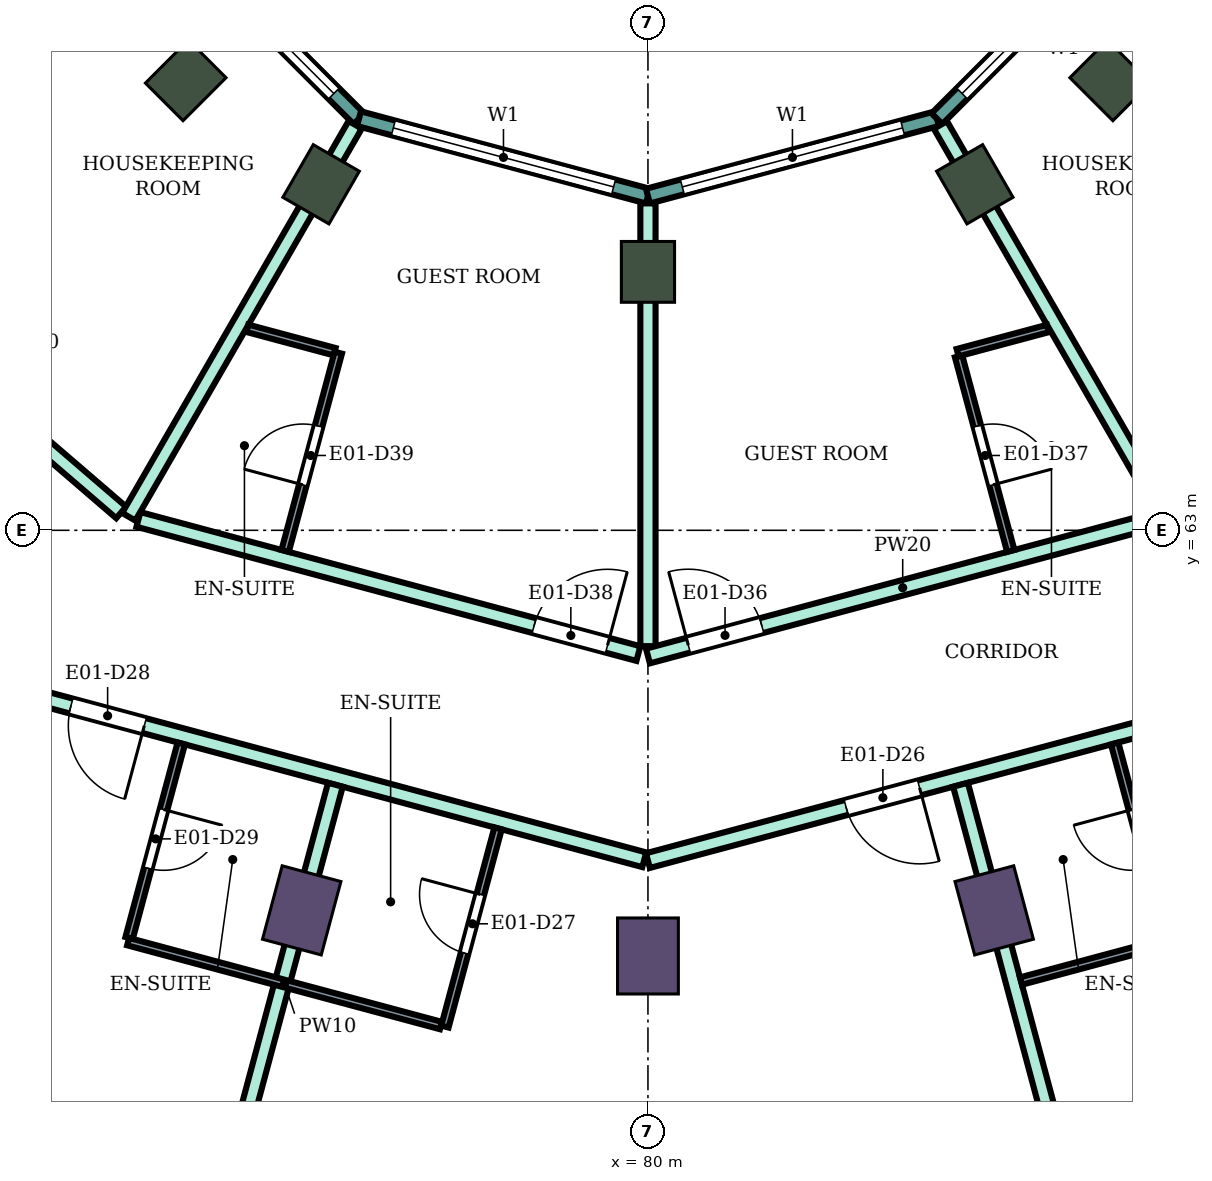
"""IFC4 building model, lengths in metres.
Left out: names, types, materials, properties, quantities, classifications, styles, units other than length and angle.
Written with IfcOpenShell. Run it as: python <this file> out.ifc"""

import sys

from ifc_helpers import new_model, si_unit, direction, frame, frame_2d, origin, origin_2d, place, context, subcontext, project, spatial, rectangle, extrude, element, fill, save


model = new_model("IFC4")
c1 = context("Model", 3, precision=1e-05, world=origin(), true_north=direction((0.0, 1.0)))
c2 = subcontext(c1, "Body", "Model", "MODEL_VIEW")
j1 = project(units=[si_unit("LENGTHUNIT", "METRE"), si_unit("PLANEANGLEUNIT", "RADIAN")], contexts=[c1])
p1 = place(None, origin())
s1 = spatial("IfcSite", under=j1, at=p1, CompositionType="ELEMENT")
p2 = place(p1, origin())
s2 = spatial("IfcBuilding", under=s1, at=p2, CompositionType="ELEMENT")
p3 = place(p2, frame((0.0, 0.0, 118.5)))
s3 = spatial("IfcBuildingStorey", under=s2, at=p3, CompositionType="ELEMENT", Elevation=118.5)
for number, where, z_axis, x_axis in (
    (1, (75.445, 58.0, 0.0), (0.0, 0.0, 1.0), (-0.259, -0.966, 0.0)),
    (2, (80.0, 57.4, 0.0), (0.0, 0.0, 1.0), (0.0, -1.0, 0.0)),
    (3, (84.555, 58.0, 0.0), (0.0, 0.0, 1.0), (0.259, -0.966, 0.0)),
):
    element("IfcColumn", number, at=place(p3, frame(where, z_axis=z_axis, x_axis=x_axis)), inside=s3, PredefinedType="COLUMN", context=c2, shape_type="SweptSolid", body=[
        extrude(rectangle(XDim=1.0, YDim=0.8, at=origin_2d()), origin(), (0.0, 0.0, 1.0), 3.9),
    ])
for number, where, z_axis, x_axis in (
    (4, (73.919, 68.919, 0.0), (0.0, 0.0, 1.0), (-0.707, -0.707, 0.0)),
    (5, (75.7, 67.552, 0.0), (0.0, 0.0, 1.0), (-0.5, -0.866, 0.0)),
    (6, (80.0, 66.4, 0.0), (0.0, 0.0, 1.0), (0.0, -1.0, 0.0)),
    (7, (84.3, 67.552, 0.0), (0.0, 0.0, 1.0), (0.5, -0.866, 0.0)),
    (8, (86.081, 68.919, 0.0), (0.0, 0.0, 1.0), (0.707, -0.707, 0.0)),
):
    element("IfcColumn", number, at=place(p3, frame(where, z_axis=z_axis, x_axis=x_axis)), inside=s3, PredefinedType="COLUMN", context=c2, shape_type="SweptSolid", body=[
        extrude(rectangle(XDim=0.8, YDim=0.7, at=origin_2d()), origin(), (0.0, 0.0, 1.0), 3.9),
    ])
p4 = place(p3, frame((73.415, 71.198, 0.0), z_axis=(0.0, 0.0, 1.0), x_axis=(0.707106781187, -0.707106781187, 0.0)))
e9 = element("IfcWall", 9, at=p4, inside=s3, PredefinedType="NOTDEFINED", context=c2, shape_type="SweptSolid", body=[
    extrude(rectangle(XDim=3.936, YDim=0.2, at=frame_2d((1.968, 0.0))), origin(), (0.0, 0.0, 1.0), 3.9),
])
p5 = place(p4, frame((0.468, 0.0, 0.9)))
e10 = element("IfcOpeningElement", 10, at=p5, cuts=e9, PredefinedType="OPENING", context=c2, shape_type="SweptSolid", body=[
    extrude(rectangle(XDim=3.0, YDim=2.3, at=frame_2d((1.5, 1.15))), frame((0.0, 0.11, 0.0), z_axis=(0.0, -1.0, 0.0), x_axis=(1.0, 0.0, 0.0)), (0.0, 0.0, 1.0), 0.22),
])
p6 = place(p3, frame((76.198, 68.415, 0.0), z_axis=(0.0, 0.0, 1.0), x_axis=(0.965933654434, -0.258789828301, 0.0)))
e11 = element("IfcWall", 11, at=p6, inside=s3, PredefinedType="NOTDEFINED", context=c2, shape_type="SweptSolid", body=[
    extrude(rectangle(XDim=3.936, YDim=0.2, at=frame_2d((1.968, 0.0))), origin(), (0.0, 0.0, 1.0), 3.9),
])
p7 = place(p6, frame((0.468, 0.0, 0.9)))
e12 = element("IfcOpeningElement", 12, at=p7, cuts=e11, PredefinedType="OPENING", context=c2, shape_type="SweptSolid", body=[
    extrude(rectangle(XDim=3.0, YDim=2.3, at=frame_2d((1.5, 1.15))), frame((0.0, 0.11, 0.0), z_axis=(0.0, -1.0, 0.0), x_axis=(1.0, 0.0, 0.0)), (0.0, 0.0, 1.0), 0.22),
])
p8 = place(p3, frame((80.0, 67.396, 0.0), z_axis=(0.0, 0.0, 1.0), x_axis=(0.965933654434, 0.258789828301, 0.0)))
e13 = element("IfcWall", 13, at=p8, inside=s3, PredefinedType="NOTDEFINED", context=c2, shape_type="SweptSolid", body=[
    extrude(rectangle(XDim=3.936, YDim=0.2, at=frame_2d((1.968, 0.0))), origin(), (0.0, 0.0, 1.0), 3.9),
])
p9 = place(p8, frame((0.468, 0.0, 0.9)))
e14 = element("IfcOpeningElement", 14, at=p9, cuts=e13, PredefinedType="OPENING", context=c2, shape_type="SweptSolid", body=[
    extrude(rectangle(XDim=3.0, YDim=2.3, at=frame_2d((1.5, 1.15))), frame((0.0, 0.11, 0.0), z_axis=(0.0, -1.0, 0.0), x_axis=(1.0, 0.0, 0.0)), (0.0, 0.0, 1.0), 0.22),
])
p10 = place(p3, frame((83.802, 68.415, 0.0), z_axis=(0.0, 0.0, 1.0), x_axis=(0.707106781187, 0.707106781187, 0.0)))
e15 = element("IfcWall", 15, at=p10, inside=s3, PredefinedType="NOTDEFINED", context=c2, shape_type="SweptSolid", body=[
    extrude(rectangle(XDim=3.936, YDim=0.2, at=frame_2d((1.968, 0.0))), origin(), (0.0, 0.0, 1.0), 3.9),
])
p11 = place(p10, frame((0.468, 0.0, 0.9)))
e16 = element("IfcOpeningElement", 16, at=p11, cuts=e15, PredefinedType="OPENING", context=c2, shape_type="SweptSolid", body=[
    extrude(rectangle(XDim=3.0, YDim=2.3, at=frame_2d((1.5, 1.15))), frame((0.0, 0.11, 0.0), z_axis=(0.0, -1.0, 0.0), x_axis=(1.0, 0.0, 0.0)), (0.0, 0.0, 1.0), 0.22),
])
p12 = place(p3, frame((69.158, 66.6, 0.0), z_axis=(0.0, 0.0, 1.0), x_axis=(0.758063092745, -0.652181222835, 0.0)))
e17 = element("IfcWall", 17, at=p12, inside=s3, PredefinedType="PARTITIONING", context=c2, shape_type="SweptSolid", body=[
    extrude(rectangle(XDim=5.16, YDim=0.2, at=frame_2d((2.58, 0.0))), origin(), (0.0, 0.0, 1.0), 3.45),
])
p13 = place(p12, frame((2.165, 0.0, 0.0)))
e18 = element("IfcOpeningElement", 18, at=p13, cuts=e17, PredefinedType="OPENING", context=c2, shape_type="SweptSolid", body=[
    extrude(rectangle(XDim=0.9, YDim=2.1, at=frame_2d((0.45, 1.05))), frame((0.0, 0.11, 0.0), z_axis=(0.0, -1.0, 0.0), x_axis=(1.0, 0.0, 0.0)), (0.0, 0.0, 1.0), 0.22),
])
p14 = place(p3, frame((71.877, 60.832, 0.0), z_axis=(0.0, 0.0, 1.0), x_axis=(0.965857276008, -0.259074742848, 0.0)))
e19 = element("IfcWall", 19, at=p14, inside=s3, PredefinedType="PARTITIONING", context=c2, shape_type="SweptSolid", body=[
    extrude(rectangle(XDim=8.36, YDim=0.2, at=frame_2d((4.18, 0.0))), origin(), (0.0, 0.0, 1.0), 3.45),
])
p15 = place(p14, frame((0.55, 0.0, 0.0)))
e20 = element("IfcOpeningElement", 20, at=p15, cuts=e19, PredefinedType="OPENING", context=c2, shape_type="SweptSolid", body=[
    extrude(rectangle(XDim=1.0, YDim=2.1, at=frame_2d((0.5, 1.05))), frame((0.0, 0.11, 0.0), z_axis=(0.0, -1.0, 0.0), x_axis=(1.0, 0.0, 0.0)), (0.0, 0.0, 1.0), 0.22),
])
p16 = place(p3, frame((73.297, 63.143, 0.0), z_axis=(0.0, 0.0, 1.0), x_axis=(0.965859030528, -0.25906820173, 0.0)))
e21 = element("IfcWall", 21, at=p16, inside=s3, PredefinedType="PARTITIONING", context=c2, shape_type="SweptSolid", body=[
    extrude(rectangle(XDim=6.81, YDim=0.2, at=frame_2d((3.405, 0.0))), origin(), (0.0, 0.0, 1.0), 3.45),
])
p17 = place(p16, frame((5.39, 0.0, 0.0)))
e22 = element("IfcOpeningElement", 22, at=p17, cuts=e21, PredefinedType="OPENING", context=c2, shape_type="SweptSolid", body=[
    extrude(rectangle(XDim=1.0, YDim=2.1, at=frame_2d((0.5, 1.05))), frame((0.0, 0.11, 0.0), z_axis=(0.0, -1.0, 0.0), x_axis=(1.0, 0.0, 0.0)), (0.0, 0.0, 1.0), 0.22),
])
p18 = place(p3, frame((73.169, 63.178, 0.0), z_axis=(0.0, 0.0, 1.0), x_axis=(0.500239348149, 0.865887171959, 0.0)))
e23 = element("IfcWall", 23, at=p18, inside=s3, PredefinedType="PARTITIONING", context=c2, shape_type="SweptSolid", body=[
    extrude(rectangle(XDim=5.955, YDim=0.2, at=frame_2d((2.978, 0.0))), origin(), (0.0, 0.0, 1.0), 3.45),
])
p19 = place(p3, frame((73.321, 50.082, 0.0), z_axis=(0.0, 0.0, 1.0), x_axis=(0.259057928998, 0.96586178588, 0.0)))
e24 = element("IfcWall", 24, at=p19, inside=s3, PredefinedType="PARTITIONING", context=c2, shape_type="SweptSolid", body=[
    extrude(rectangle(XDim=9.909, YDim=0.2, at=frame_2d((4.954, 0.0))), origin(), (0.0, 0.0, 1.0), 3.45),
])
p20 = place(p3, frame((80.0, 58.655, 0.0), z_axis=(0.0, 0.0, 1.0), x_axis=(0.965967338894, 0.258664068224, 0.0)))
e25 = element("IfcWall", 25, at=p20, inside=s3, PredefinedType="PARTITIONING", context=c2, shape_type="SweptSolid", body=[
    extrude(rectangle(XDim=8.36, YDim=0.2, at=frame_2d((4.18, 0.0))), origin(), (0.0, 0.0, 1.0), 3.45),
])
p21 = place(p20, frame((6.86, 0.0, 0.0)))
e26 = element("IfcOpeningElement", 26, at=p21, cuts=e25, PredefinedType="OPENING", context=c2, shape_type="SweptSolid", body=[
    extrude(rectangle(XDim=1.0, YDim=2.1, at=frame_2d((0.5, 1.05))), frame((0.0, 0.11, 0.0), z_axis=(0.0, -1.0, 0.0), x_axis=(1.0, 0.0, 0.0)), (0.0, 0.0, 1.0), 0.22),
])
p22 = place(p20, frame((2.7, 0.0, 0.0)))
e27 = element("IfcOpeningElement", 27, at=p22, cuts=e25, PredefinedType="OPENING", context=c2, shape_type="SweptSolid", body=[
    extrude(rectangle(XDim=1.0, YDim=2.1, at=frame_2d((0.5, 1.05))), frame((0.0, 0.11, 0.0), z_axis=(0.0, -1.0, 0.0), x_axis=(1.0, 0.0, 0.0)), (0.0, 0.0, 1.0), 0.22),
])
p23 = place(p3, frame((80.0, 61.476, 0.0), z_axis=(0.0, 0.0, 1.0), x_axis=(0.0, 1.0, 0.0)))
e28 = element("IfcWall", 28, at=p23, inside=s3, PredefinedType="PARTITIONING", context=c2, shape_type="SweptSolid", body=[
    extrude(rectangle(XDim=5.825, YDim=0.2, at=frame_2d((2.913, 0.0))), origin(), (0.0, 0.0, 1.0), 3.45),
])
p24 = place(p3, frame((80.0, 61.346, 0.0), z_axis=(0.0, 0.0, 1.0), x_axis=(0.965924181808, 0.258825182312, 0.0)))
e29 = element("IfcWall", 29, at=p24, inside=s3, PredefinedType="PARTITIONING", context=c2, shape_type="SweptSolid", body=[
    extrude(rectangle(XDim=6.94, YDim=0.2, at=frame_2d((3.47, 0.0))), origin(), (0.0, 0.0, 1.0), 3.45),
])
p25 = place(p24, frame((0.55, 0.0, 0.0)))
e30 = element("IfcOpeningElement", 30, at=p25, cuts=e29, PredefinedType="OPENING", context=c2, shape_type="SweptSolid", body=[
    extrude(rectangle(XDim=1.0, YDim=2.1, at=frame_2d((0.5, 1.05))), frame((0.0, 0.11, 0.0), z_axis=(0.0, -1.0, 0.0), x_axis=(1.0, 0.0, 0.0)), (0.0, 0.0, 1.0), 0.22),
])
p26 = place(p3, frame((83.848, 68.332, 0.0), z_axis=(0.0, 0.0, 1.0), x_axis=(0.499933000352, -0.866064082594, 0.0)))
e31 = element("IfcWall", 31, at=p26, inside=s3, PredefinedType="PARTITIONING", context=c2, shape_type="SweptSolid", body=[
    extrude(rectangle(XDim=5.855, YDim=0.2, at=frame_2d((2.928, 0.0))), origin(), (0.0, 0.0, 1.0), 3.45),
])
p27 = place(p3, frame((84.112, 59.652, 0.0), z_axis=(0.0, 0.0, 1.0), x_axis=(0.258838718107, -0.965920554709, 0.0)))
e32 = element("IfcWall", 32, at=p27, inside=s3, PredefinedType="PARTITIONING", context=c2, shape_type="SweptSolid", body=[
    extrude(rectangle(XDim=9.908, YDim=0.2, at=frame_2d((4.954, 0.0))), origin(), (0.0, 0.0, 1.0), 3.45),
])
p28 = place(p3, frame((73.174, 57.636, 0.0), z_axis=(0.0, 0.0, 1.0), x_axis=(0.258952498977, 0.96589005755, 0.0)))
e33 = element("IfcWall", 33, at=p28, inside=s3, PredefinedType="PARTITIONING", context=c2, shape_type="SweptSolid", body=[
    extrude(rectangle(XDim=2.65, YDim=0.1, at=frame_2d((1.325, 0.0))), origin(), (0.0, 0.0, 1.0), 3.45),
])
p29 = place(p28, frame((0.95, 0.0, 0.0)))
e34 = element("IfcOpeningElement", 34, at=p29, cuts=e33, PredefinedType="OPENING", context=c2, shape_type="SweptSolid", body=[
    extrude(rectangle(XDim=0.8, YDim=2.1, at=frame_2d((0.4, 1.05))), frame((0.0, 0.06, 0.0), z_axis=(0.0, -1.0, 0.0), x_axis=(1.0, 0.0, 0.0)), (0.0, 0.0, 1.0), 0.12),
])
p30 = place(p3, frame((73.161, 57.588, 0.0), z_axis=(0.0, 0.0, 1.0), x_axis=(0.965858226827, -0.259071198071, 0.0)))
e35 = element("IfcWall", 35, at=p30, inside=s3, PredefinedType="PARTITIONING", context=c2, shape_type="SweptSolid", body=[
    extrude(rectangle(XDim=4.26, YDim=0.1, at=frame_2d((2.13, 0.0))), origin(), (0.0, 0.0, 1.0), 3.45),
])
p31 = place(p3, frame((74.729, 65.657, 0.0), z_axis=(0.0, 0.0, 1.0), x_axis=(0.965948051503, -0.258736085224, 0.0)))
e36 = element("IfcWall", 36, at=p31, inside=s3, PredefinedType="PARTITIONING", context=c2, shape_type="SweptSolid", body=[
    extrude(rectangle(XDim=1.189, YDim=0.1, at=frame_2d((0.594, 0.0))), origin(), (0.0, 0.0, 1.0), 3.45),
])
p32 = place(p3, frame((75.227, 62.729, 0.0), z_axis=(0.0, 0.0, 1.0), x_axis=(0.258945475746, 0.965891940432, 0.0)))
e37 = element("IfcWall", 37, at=p32, inside=s3, PredefinedType="PARTITIONING", context=c2, shape_type="SweptSolid", body=[
    extrude(rectangle(XDim=2.7, YDim=0.1, at=frame_2d((1.35, 0.0))), origin(), (0.0, 0.0, 1.0), 3.45),
])
p33 = place(p32, frame((0.9, 0.0, 0.0)))
e38 = element("IfcOpeningElement", 38, at=p33, cuts=e37, PredefinedType="OPENING", context=c2, shape_type="SweptSolid", body=[
    extrude(rectangle(XDim=0.8, YDim=2.1, at=frame_2d((0.4, 1.05))), frame((0.0, 0.06, 0.0), z_axis=(0.0, -1.0, 0.0), x_axis=(1.0, 0.0, 0.0)), (0.0, 0.0, 1.0), 0.12),
])
p34 = place(p3, frame((77.329, 56.471, 0.0), z_axis=(0.0, 0.0, 1.0), x_axis=(0.259013334072, 0.965873745773, 0.0)))
e39 = element("IfcWall", 39, at=p34, inside=s3, PredefinedType="PARTITIONING", context=c2, shape_type="SweptSolid", body=[
    extrude(rectangle(XDim=2.699, YDim=0.1, at=frame_2d((1.35, 0.0))), origin(), (0.0, 0.0, 1.0), 3.45),
])
p35 = place(p34, frame((1.0, 0.0, 0.0)))
e40 = element("IfcOpeningElement", 40, at=p35, cuts=e39, PredefinedType="OPENING", context=c2, shape_type="SweptSolid", body=[
    extrude(rectangle(XDim=0.8, YDim=2.1, at=frame_2d((0.4, 1.05))), frame((0.0, 0.06, 0.0), z_axis=(0.0, -1.0, 0.0), x_axis=(1.0, 0.0, 0.0)), (0.0, 0.0, 1.0), 0.12),
])
p36 = place(p3, frame((84.087, 65.289, 0.0), z_axis=(0.0, 0.0, 1.0), x_axis=(0.258929459649, -0.965896234037, 0.0)))
e41 = element("IfcWall", 41, at=p36, inside=s3, PredefinedType="PARTITIONING", context=c2, shape_type="SweptSolid", body=[
    extrude(rectangle(XDim=2.65, YDim=0.1, at=frame_2d((1.325, 0.0))), origin(), (0.0, 0.0, 1.0), 3.45),
])
p37 = place(p36, frame((0.95, 0.0, 0.0)))
e42 = element("IfcOpeningElement", 42, at=p37, cuts=e41, PredefinedType="OPENING", context=c2, shape_type="SweptSolid", body=[
    extrude(rectangle(XDim=0.8, YDim=2.1, at=frame_2d((0.4, 1.05))), frame((0.0, 0.06, 0.0), z_axis=(0.0, -1.0, 0.0), x_axis=(1.0, 0.0, 0.0)), (0.0, 0.0, 1.0), 0.12),
])
p38 = place(p3, frame((84.074, 65.337, 0.0), z_axis=(0.0, 0.0, 1.0), x_axis=(0.965914351064, 0.258861867428, 0.0)))
e43 = element("IfcWall", 43, at=p38, inside=s3, PredefinedType="PARTITIONING", context=c2, shape_type="SweptSolid", body=[
    extrude(rectangle(XDim=1.229, YDim=0.1, at=frame_2d((0.615, 0.0))), origin(), (0.0, 0.0, 1.0), 3.45),
])
p39 = place(p3, frame((84.908, 57.07, 0.0), z_axis=(0.0, 0.0, 1.0), x_axis=(0.965853538138, 0.25908867761, 0.0)))
e44 = element("IfcWall", 44, at=p39, inside=s3, PredefinedType="PARTITIONING", context=c2, shape_type="SweptSolid", body=[
    extrude(rectangle(XDim=1.95, YDim=0.1, at=frame_2d((0.975, 0.0))), origin(), (0.0, 0.0, 1.0), 3.45),
])
p40 = place(p3, frame((86.14, 60.196, 0.0), z_axis=(0.0, 0.0, 1.0), x_axis=(0.258945475746, -0.965891940432, 0.0)))
e45 = element("IfcWall", 45, at=p40, inside=s3, PredefinedType="PARTITIONING", context=c2, shape_type="SweptSolid", body=[
    extrude(rectangle(XDim=2.7, YDim=0.1, at=frame_2d((1.35, 0.0))), origin(), (0.0, 0.0, 1.0), 3.45),
])
p41 = place(p40, frame((0.9, 0.0, 0.0)))
e46 = element("IfcOpeningElement", 46, at=p41, cuts=e45, PredefinedType="OPENING", context=c2, shape_type="SweptSolid", body=[
    extrude(rectangle(XDim=0.8, YDim=2.1, at=frame_2d((0.4, 1.05))), frame((0.0, 0.06, 0.0), z_axis=(0.0, -1.0, 0.0), x_axis=(1.0, 0.0, 0.0)), (0.0, 0.0, 1.0), 0.12),
])
p42 = place(p5, origin())
e47 = element("IfcWindow", 47, at=p42, inside=s3, PartitioningType="SINGLE_PANEL", PredefinedType="WINDOW", context=c2, shape_type="SweptSolid", body=[
    extrude(rectangle(XDim=3.0, YDim=2.3, at=frame_2d((1.5, 1.15))), frame((0.0, 0.03, 0.0), z_axis=(0.0, -1.0, 0.0), x_axis=(1.0, 0.0, 0.0)), (0.0, 0.0, 1.0), 0.06),
])
fill(e10, e47)
p43 = place(p7, origin())
e48 = element("IfcWindow", 48, at=p43, inside=s3, PartitioningType="SINGLE_PANEL", PredefinedType="WINDOW", context=c2, shape_type="SweptSolid", body=[
    extrude(rectangle(XDim=3.0, YDim=2.3, at=frame_2d((1.5, 1.15))), frame((0.0, 0.03, 0.0), z_axis=(0.0, -1.0, 0.0), x_axis=(1.0, 0.0, 0.0)), (0.0, 0.0, 1.0), 0.06),
])
fill(e12, e48)
p44 = place(p9, origin())
e49 = element("IfcWindow", 49, at=p44, inside=s3, PartitioningType="SINGLE_PANEL", PredefinedType="WINDOW", context=c2, shape_type="SweptSolid", body=[
    extrude(rectangle(XDim=3.0, YDim=2.3, at=frame_2d((1.5, 1.15))), frame((0.0, 0.03, 0.0), z_axis=(0.0, -1.0, 0.0), x_axis=(1.0, 0.0, 0.0)), (0.0, 0.0, 1.0), 0.06),
])
fill(e14, e49)
p45 = place(p11, origin())
e50 = element("IfcWindow", 50, at=p45, inside=s3, PartitioningType="SINGLE_PANEL", PredefinedType="WINDOW", context=c2, shape_type="SweptSolid", body=[
    extrude(rectangle(XDim=3.0, YDim=2.3, at=frame_2d((1.5, 1.15))), frame((0.0, 0.03, 0.0), z_axis=(0.0, -1.0, 0.0), x_axis=(1.0, 0.0, 0.0)), (0.0, 0.0, 1.0), 0.06),
])
fill(e16, e50)
p46 = place(p41, frame((0.8, 0.0, 0.0), z_axis=(0.0, 0.0, 1.0), x_axis=(-1.0, 0.0, 0.0)))
e51 = element("IfcDoor", 51, at=p46, inside=s3, OperationType="SINGLE_SWING_RIGHT", PredefinedType="DOOR", context=c2, shape_type="SweptSolid", body=[
    extrude(rectangle(XDim=0.8, YDim=2.1, at=frame_2d((0.4, 1.05))), frame((0.0, 0.025, 0.0), z_axis=(0.0, -1.0, 0.0), x_axis=(1.0, 0.0, 0.0)), (0.0, 0.0, 1.0), 0.05),
])
fill(e46, e51)
p47 = place(p22, frame((1.0, 0.0, 0.0), z_axis=(0.0, 0.0, 1.0), x_axis=(-1.0, 0.0, 0.0)))
e52 = element("IfcDoor", 52, at=p47, inside=s3, OperationType="SINGLE_SWING_LEFT", PredefinedType="DOOR", context=c2, shape_type="SweptSolid", body=[
    extrude(rectangle(XDim=1.0, YDim=2.1, at=frame_2d((0.5, 1.05))), frame((0.0, 0.025, 0.0), z_axis=(0.0, -1.0, 0.0), x_axis=(1.0, 0.0, 0.0)), (0.0, 0.0, 1.0), 0.05),
])
fill(e27, e52)
p48 = place(p35, origin())
e53 = element("IfcDoor", 53, at=p48, inside=s3, OperationType="SINGLE_SWING_RIGHT", PredefinedType="DOOR", context=c2, shape_type="SweptSolid", body=[
    extrude(rectangle(XDim=0.8, YDim=2.1, at=frame_2d((0.4, 1.05))), frame((0.0, 0.025, 0.0), z_axis=(0.0, -1.0, 0.0), x_axis=(1.0, 0.0, 0.0)), (0.0, 0.0, 1.0), 0.05),
])
fill(e40, e53)
p49 = place(p15, frame((1.0, 0.0, 0.0), z_axis=(0.0, 0.0, 1.0), x_axis=(-1.0, 0.0, 0.0)))
e54 = element("IfcDoor", 54, at=p49, inside=s3, OperationType="SINGLE_SWING_LEFT", PredefinedType="DOOR", context=c2, shape_type="SweptSolid", body=[
    extrude(rectangle(XDim=1.0, YDim=2.1, at=frame_2d((0.5, 1.05))), frame((0.0, 0.025, 0.0), z_axis=(0.0, -1.0, 0.0), x_axis=(1.0, 0.0, 0.0)), (0.0, 0.0, 1.0), 0.05),
])
fill(e20, e54)
p50 = place(p29, frame((0.8, 0.0, 0.0), z_axis=(0.0, 0.0, 1.0), x_axis=(-1.0, 0.0, 0.0)))
e55 = element("IfcDoor", 55, at=p50, inside=s3, OperationType="SINGLE_SWING_LEFT", PredefinedType="DOOR", context=c2, shape_type="SweptSolid", body=[
    extrude(rectangle(XDim=0.8, YDim=2.1, at=frame_2d((0.4, 1.05))), frame((0.0, 0.025, 0.0), z_axis=(0.0, -1.0, 0.0), x_axis=(1.0, 0.0, 0.0)), (0.0, 0.0, 1.0), 0.05),
])
fill(e34, e55)
p51 = place(p25, origin())
e56 = element("IfcDoor", 56, at=p51, inside=s3, OperationType="SINGLE_SWING_LEFT", PredefinedType="DOOR", context=c2, shape_type="SweptSolid", body=[
    extrude(rectangle(XDim=1.0, YDim=2.1, at=frame_2d((0.5, 1.05))), frame((0.0, 0.025, 0.0), z_axis=(0.0, -1.0, 0.0), x_axis=(1.0, 0.0, 0.0)), (0.0, 0.0, 1.0), 0.05),
])
fill(e30, e56)
p52 = place(p37, origin())
e57 = element("IfcDoor", 57, at=p52, inside=s3, OperationType="SINGLE_SWING_RIGHT", PredefinedType="DOOR", context=c2, shape_type="SweptSolid", body=[
    extrude(rectangle(XDim=0.8, YDim=2.1, at=frame_2d((0.4, 1.05))), frame((0.0, 0.025, 0.0), z_axis=(0.0, -1.0, 0.0), x_axis=(1.0, 0.0, 0.0)), (0.0, 0.0, 1.0), 0.05),
])
fill(e42, e57)
p53 = place(p17, origin())
e58 = element("IfcDoor", 58, at=p53, inside=s3, OperationType="SINGLE_SWING_RIGHT", PredefinedType="DOOR", context=c2, shape_type="SweptSolid", body=[
    extrude(rectangle(XDim=1.0, YDim=2.1, at=frame_2d((0.5, 1.05))), frame((0.0, 0.025, 0.0), z_axis=(0.0, -1.0, 0.0), x_axis=(1.0, 0.0, 0.0)), (0.0, 0.0, 1.0), 0.05),
])
fill(e22, e58)
p54 = place(p33, origin())
e59 = element("IfcDoor", 59, at=p54, inside=s3, OperationType="SINGLE_SWING_LEFT", PredefinedType="DOOR", context=c2, shape_type="SweptSolid", body=[
    extrude(rectangle(XDim=0.8, YDim=2.1, at=frame_2d((0.4, 1.05))), frame((0.0, 0.025, 0.0), z_axis=(0.0, -1.0, 0.0), x_axis=(1.0, 0.0, 0.0)), (0.0, 0.0, 1.0), 0.05),
])
fill(e38, e59)
save(model, sys.argv[1])
